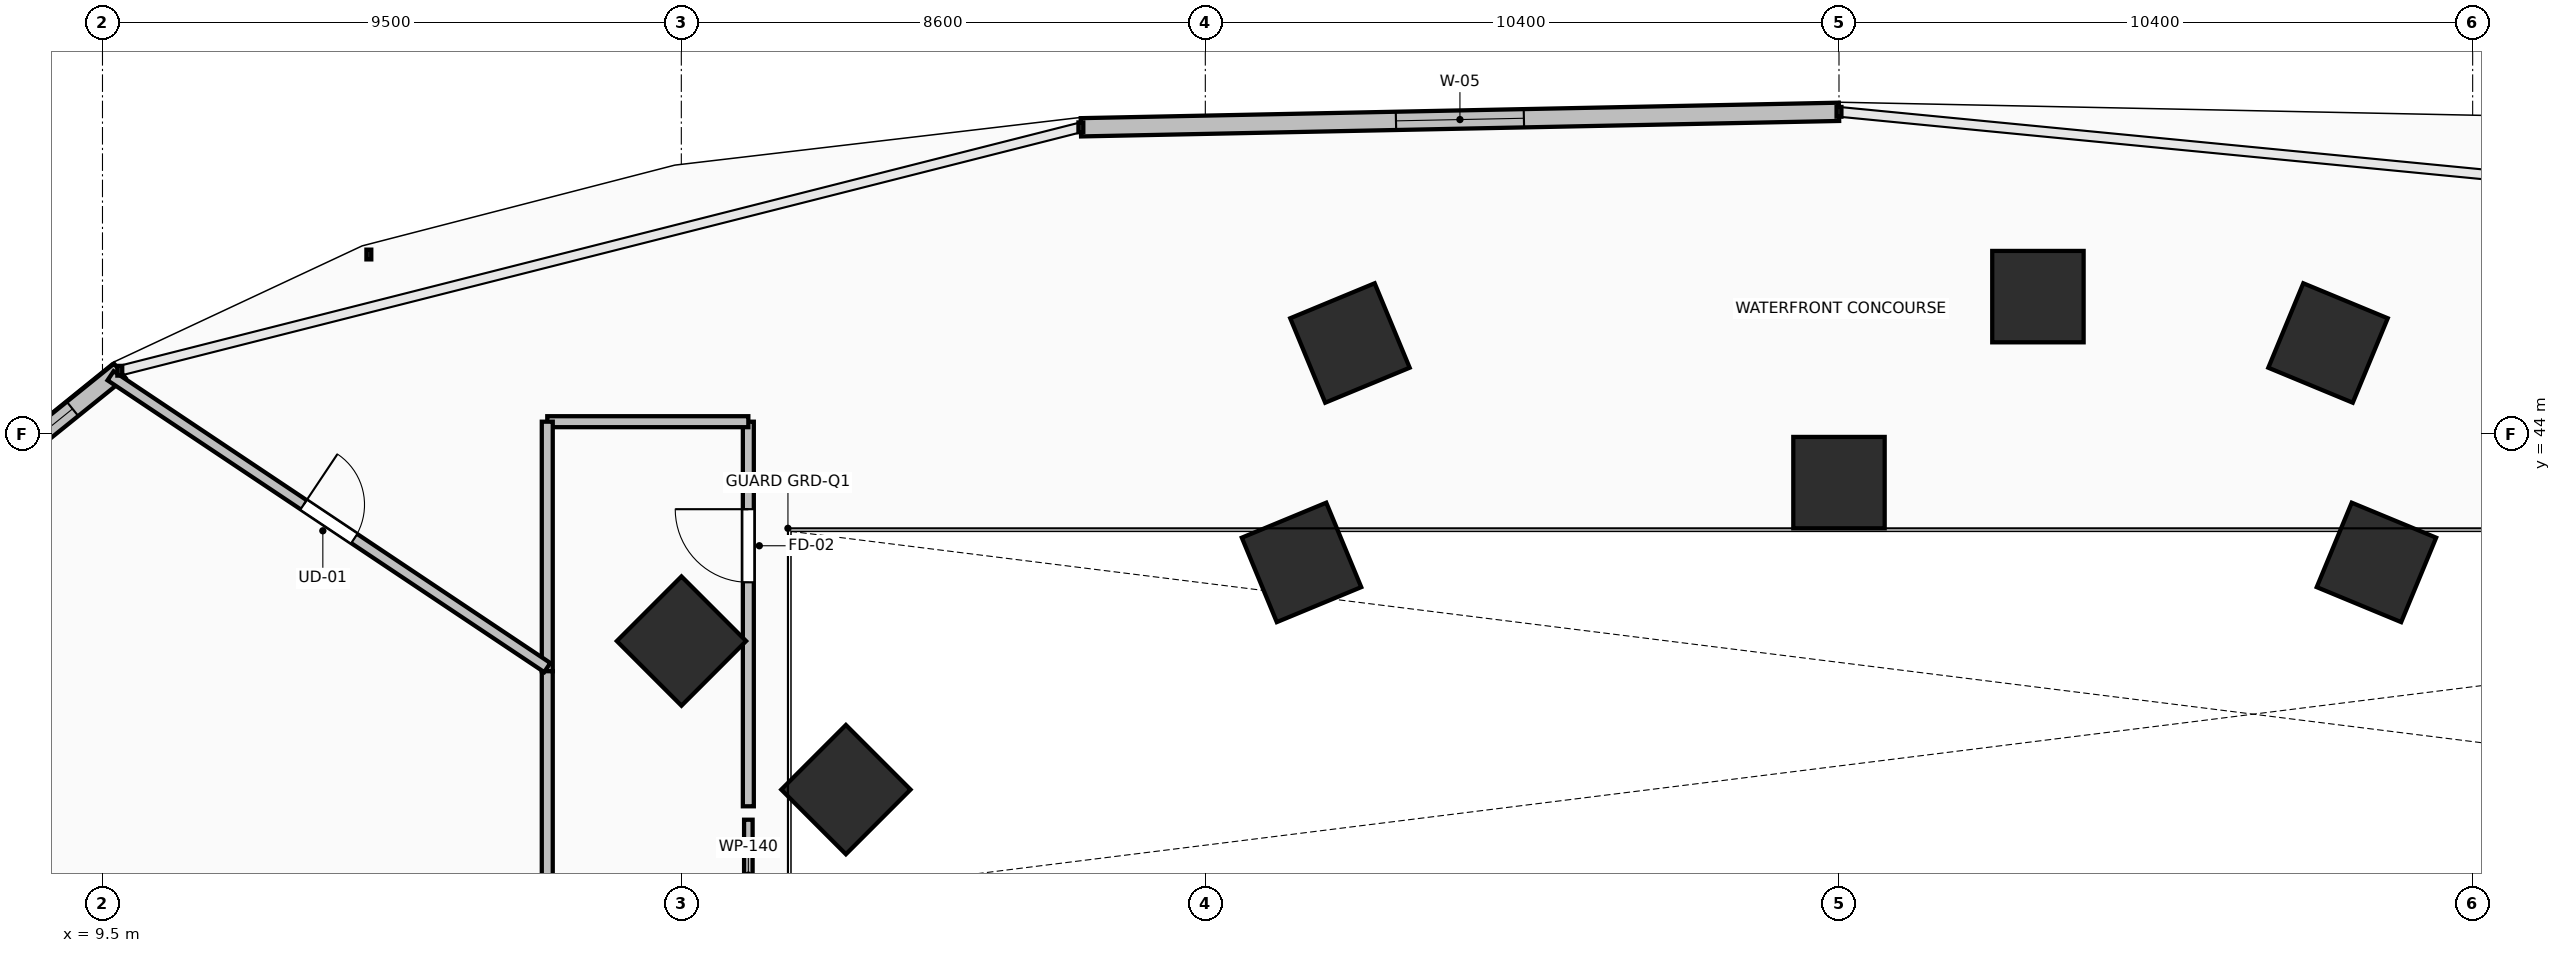
"""IFC4 building model, lengths in metres.
Left out: names, types, materials, properties, quantities, classifications, styles, units other than length and angle.
Written with IfcOpenShell. Run it as: python <this file> out.ifc"""

import sys

from ifc_helpers import new_model, si_unit, direction, frame, frame_2d, origin, origin_2d, place, context, subcontext, project, spatial, rectangle, extrude, element, fill, save


model = new_model("IFC4")
c1 = context("Model", 3, precision=1e-05, world=origin(), true_north=direction((0.0, 1.0)))
c2 = subcontext(c1, "Body", "Model", "MODEL_VIEW")
j1 = project(units=[si_unit("LENGTHUNIT", "METRE"), si_unit("PLANEANGLEUNIT", "RADIAN")], contexts=[c1])
p1 = place(None, origin())
s1 = spatial("IfcSite", under=j1, at=p1, CompositionType="ELEMENT")
p2 = place(p1, origin())
s2 = spatial("IfcBuilding", under=s1, at=p2, CompositionType="ELEMENT")
p3 = place(p2, origin())
s3 = spatial("IfcBuildingStorey", under=s2, at=p3, CompositionType="ELEMENT", Elevation=0.0)
for number, where, z_axis, x_axis in (
    (1, (46.821, 41.891, 0.0), (0.0, 0.0, 1.0), (0.383, 0.924, 0.0)),
    (2, (38.0, 43.2, 0.0), (0.0, 0.0, 1.0), (0.0, 1.0, 0.0)),
    (3, (29.179, 41.891, 0.0), (0.0, 0.0, 1.0), (-0.383, 0.924, 0.0)),
    (4, (21.701, 38.162, 0.0), (0.0, 0.0, 1.0), (-0.707, 0.707, 0.0)),
    (5, (46.026, 45.492, 0.0), (0.0, 0.0, 1.0), (0.383, 0.924, 0.0)),
    (6, (41.265, 46.252, 0.0), (0.0, 0.0, 1.0), (0.0, 1.0, 0.0)),
    (7, (29.974, 45.492, 0.0), (0.0, 0.0, 1.0), (-0.383, 0.924, 0.0)),
    (8, (19.003, 40.6, 0.0), (0.0, 0.0, 1.0), (-0.707, 0.707, 0.0)),
):
    element("IfcColumn", number, at=place(p3, frame(where, z_axis=z_axis, x_axis=x_axis)), inside=s3, PredefinedType="COLUMN", context=c2, shape_type="SweptSolid", body=[
        extrude(rectangle(XDim=1.5, YDim=1.5, at=origin_2d()), origin(), (0.0, 0.0, 1.0), 4.8),
    ])
p4 = place(p3, frame((38.0, 49.285, 0.0), z_axis=(0.0, 0.0, 1.0), x_axis=(-0.999791851131, -0.020402313892, 0.0)))
e9 = element("IfcWall", 9, at=p4, inside=s3, PredefinedType="STANDARD", context=c2, shape_type="SweptSolid", body=[
    extrude(rectangle(XDim=12.445, YDim=0.3, at=frame_2d((6.223, 0.0))), origin(), (0.0, 0.0, 1.0), 4.48),
])
p5 = place(p4, frame((5.172, 0.0, 0.9)))
e10 = element("IfcOpeningElement", 10, at=p5, cuts=e9, PredefinedType="OPENING", context=c2, shape_type="SweptSolid", body=[
    extrude(rectangle(XDim=2.1, YDim=2.4, at=frame_2d((1.05, 1.2))), frame((0.0, 0.165, 0.0), z_axis=(0.0, -1.0, 0.0), x_axis=(1.0, 0.0, 0.0)), (0.0, 0.0, 1.0), 0.33),
])
p6 = place(p3, frame((9.784, 45.036, 0.0), z_axis=(0.0, 0.0, 1.0), x_axis=(-0.778389533764, -0.627781597155, 0.0)))
e11 = element("IfcWall", 11, at=p6, inside=s3, PredefinedType="STANDARD", context=c2, shape_type="SweptSolid", body=[
    extrude(rectangle(XDim=4.093, YDim=0.3, at=frame_2d((2.046, 0.0))), origin(), (0.0, 0.0, 1.0), 4.48),
])
p7 = place(p6, frame((0.997, 0.0, 0.9)))
e12 = element("IfcOpeningElement", 12, at=p7, cuts=e11, PredefinedType="OPENING", context=c2, shape_type="SweptSolid", body=[
    extrude(rectangle(XDim=2.1, YDim=2.4, at=frame_2d((1.05, 1.2))), frame((0.0, 0.165, 0.0), z_axis=(0.0, -1.0, 0.0), x_axis=(1.0, 0.0, 0.0)), (0.0, 0.0, 1.0), 0.33),
])
p8 = place(p3, frame((20.1, 37.888, 0.0), z_axis=(0.0, 0.0, 1.0), x_axis=(0.0, 1.0, 0.0)))
e13 = element("IfcWall", 13, at=p8, inside=s3, PredefinedType="PARTITIONING", context=c2, shape_type="SweptSolid", body=[
    extrude(rectangle(XDim=6.312, YDim=0.18, at=frame_2d((3.156, 0.0))), origin(), (0.0, 0.0, 1.0), 3.672),
])
p9 = place(p8, frame((3.676, 0.0, 0.0)))
e14 = element("IfcOpeningElement", 14, at=p9, cuts=e13, PredefinedType="OPENING", context=c2, shape_type="SweptSolid", body=[
    extrude(rectangle(XDim=1.2, YDim=2.15, at=frame_2d((0.6, 1.075))), frame((0.0, 0.105, 0.0), z_axis=(0.0, -1.0, 0.0), x_axis=(1.0, 0.0, 0.0)), (0.0, 0.0, 1.0), 0.21),
])
p10 = place(p3, frame((20.1, 44.2, 0.0), z_axis=(0.0, 0.0, 1.0), x_axis=(-1.0, 0.0, 0.0)))
e15 = element("IfcWall", 15, at=p10, inside=s3, PredefinedType="PARTITIONING", context=c2, shape_type="SweptSolid", body=[
    extrude(rectangle(XDim=3.3, YDim=0.18, at=frame_2d((1.65, 0.0))), origin(), (0.0, 0.0, 1.0), 4.48),
])
p11 = place(p3, frame((16.8, 44.2, 0.0), z_axis=(0.0, 0.0, 1.0), x_axis=(0.0, -1.0, 0.0)))
e16 = element("IfcWall", 16, at=p11, inside=s3, PredefinedType="PARTITIONING", context=c2, shape_type="SweptSolid", body=[
    extrude(rectangle(XDim=4.095, YDim=0.18, at=frame_2d((2.047, 0.0))), origin(), (0.0, 0.0, 1.0), 4.48),
])
p12 = place(p3, frame((16.8, 40.105, 0.0), z_axis=(0.0, 0.0, 1.0), x_axis=(0.0, -1.0, 0.0)))
e17 = element("IfcWall", 17, at=p12, inside=s3, PredefinedType="PARTITIONING", context=c2, shape_type="SweptSolid", body=[
    extrude(rectangle(XDim=4.255, YDim=0.18, at=frame_2d((2.127, 0.0))), origin(), (0.0, 0.0, 1.0), 3.769),
])
p13 = place(p3, frame((9.633, 44.954, 0.0), z_axis=(0.0, 0.0, 1.0), x_axis=(0.83145721005, -0.555588793853, 0.0)))
e18 = element("IfcWall", 18, at=p13, inside=s3, PredefinedType="PARTITIONING", context=c2, shape_type="SweptSolid", body=[
    extrude(rectangle(XDim=8.62, YDim=0.18, at=frame_2d((4.31, 0.0))), origin(), (0.0, 0.0, 1.0), 4.48),
])
p14 = place(p13, frame((3.81, 0.0, 0.0)))
e19 = element("IfcOpeningElement", 19, at=p14, cuts=e18, PredefinedType="OPENING", context=c2, shape_type="SweptSolid", body=[
    extrude(rectangle(XDim=1.0, YDim=2.15, at=frame_2d((0.5, 1.075))), frame((0.0, 0.105, 0.0), z_axis=(0.0, -1.0, 0.0), x_axis=(1.0, 0.0, 0.0)), (0.0, 0.0, 1.0), 0.21),
])
p15 = place(p3, frame((20.1, 35.85, 0.0), z_axis=(0.0, 0.0, 1.0), x_axis=(0.0, 1.0, 0.0)))
e20 = element("IfcWall", 20, at=p15, inside=s3, PredefinedType="PARTITIONING", context=c2, shape_type="SweptSolid", body=[
    extrude(rectangle(XDim=1.818, YDim=0.14, at=frame_2d((0.909, 0.0))), origin(), (0.0, 0.0, 1.0), 4.162),
])
p16 = place(p5, origin())
e21 = element("IfcWindow", 21, at=p16, inside=s3, PartitioningType="SINGLE_PANEL", PredefinedType="WINDOW", context=c2, shape_type="SweptSolid", body=[
    extrude(rectangle(XDim=2.1, YDim=2.4, at=frame_2d((1.05, 1.2))), frame((0.0, 0.03, 0.0), z_axis=(0.0, -1.0, 0.0), x_axis=(1.0, 0.0, 0.0)), (0.0, 0.0, 1.0), 0.06),
])
fill(e10, e21)
p17 = place(p7, origin())
e22 = element("IfcWindow", 22, at=p17, inside=s3, PartitioningType="SINGLE_PANEL", PredefinedType="WINDOW", context=c2, shape_type="SweptSolid", body=[
    extrude(rectangle(XDim=2.1, YDim=2.4, at=frame_2d((1.05, 1.2))), frame((0.0, 0.03, 0.0), z_axis=(0.0, -1.0, 0.0), x_axis=(1.0, 0.0, 0.0)), (0.0, 0.0, 1.0), 0.06),
])
fill(e12, e22)
p18 = place(p9, origin())
e23 = element("IfcDoor", 23, at=p18, inside=s3, OperationType="SINGLE_SWING_RIGHT", PredefinedType="DOOR", context=c2, shape_type="SweptSolid", body=[
    extrude(rectangle(XDim=1.2, YDim=2.15, at=frame_2d((0.6, 1.075))), frame((0.0, 0.025, 0.0), z_axis=(0.0, -1.0, 0.0), x_axis=(1.0, 0.0, 0.0)), (0.0, 0.0, 1.0), 0.05),
])
fill(e14, e23)
p19 = place(p14, origin())
e24 = element("IfcDoor", 24, at=p19, inside=s3, OperationType="SINGLE_SWING_LEFT", PredefinedType="DOOR", context=c2, shape_type="SweptSolid", body=[
    extrude(rectangle(XDim=1.0, YDim=2.15, at=frame_2d((0.5, 1.075))), frame((0.0, 0.025, 0.0), z_axis=(0.0, -1.0, 0.0), x_axis=(1.0, 0.0, 0.0)), (0.0, 0.0, 1.0), 0.05),
])
fill(e19, e24)
save(model, sys.argv[1])
